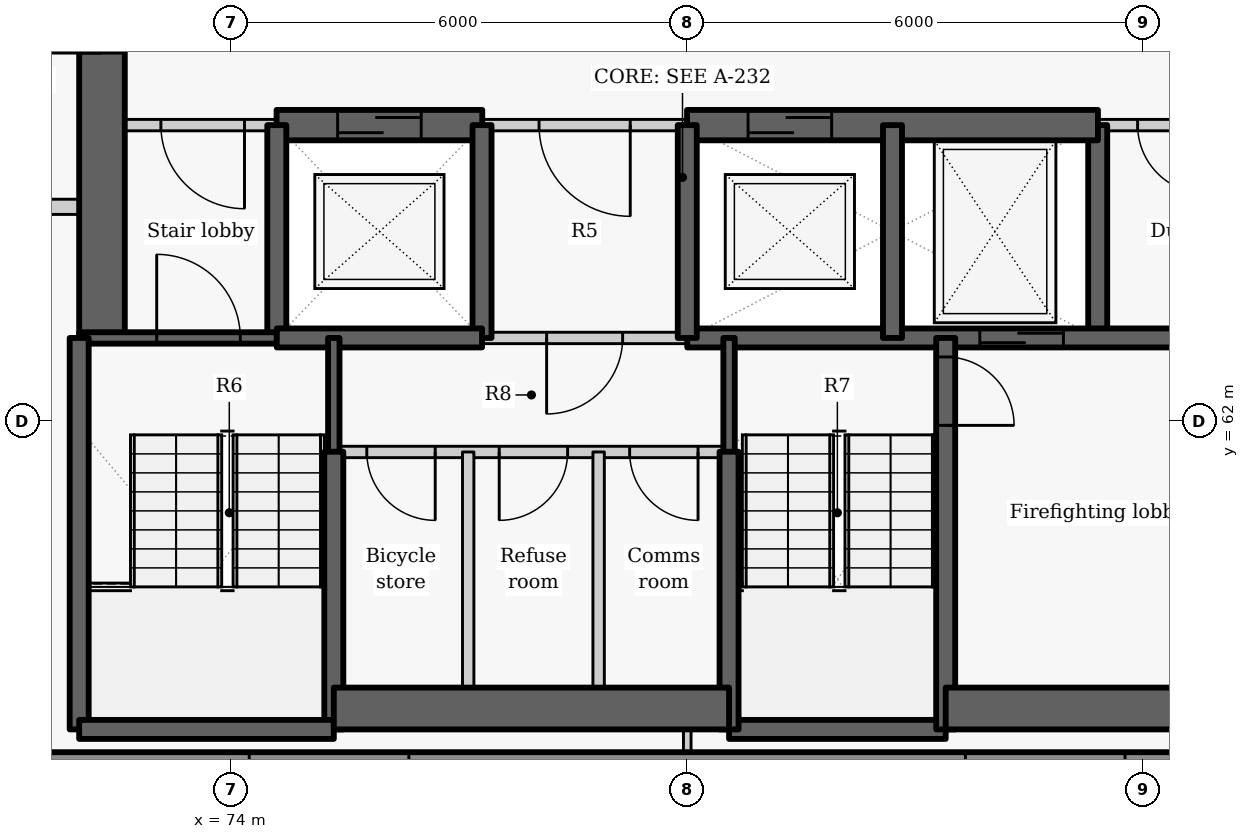
"""IFC4 building model, lengths in metres.
Left out: names, types, materials, properties, quantities, classifications, styles, units other than length and angle.
Written with IfcOpenShell. Run it as: python <this file> out.ifc"""

import sys

from ifc_helpers import new_model, si_unit, direction, frame, frame_2d, origin, place, context, subcontext, project, spatial, rectangle, extrude, element, fill, save


model = new_model("IFC4")
c1 = context("Model", 3, precision=1e-05, world=origin(), true_north=direction((0.0, 1.0)))
c2 = subcontext(c1, "Body", "Model", "MODEL_VIEW")
j1 = project(units=[si_unit("LENGTHUNIT", "METRE"), si_unit("PLANEANGLEUNIT", "RADIAN")], contexts=[c1])
p1 = place(None, origin())
s1 = spatial("IfcSite", under=j1, at=p1, CompositionType="ELEMENT")
p2 = place(p1, origin())
s2 = spatial("IfcBuilding", under=s1, at=p2, CompositionType="ELEMENT")
p3 = place(p2, frame((0.0, 0.0, 180.0)))
s3 = spatial("IfcBuildingStorey", under=s2, at=p3, CompositionType="ELEMENT", Elevation=180.0)
p4 = place(p3, frame((70.551, 57.5, 0.0), z_axis=(0.0, 0.0, 1.0), x_axis=(1.0, 0.0, 0.0)))
e1 = element("IfcWall", 1, at=p4, inside=s3, PredefinedType="SOLIDWALL", context=c2, shape_type="SweptSolid", body=[
    extrude(rectangle(XDim=18.893, YDim=0.3, at=frame_2d((9.446, 0.0))), origin(), (0.0, 0.0, 1.0), 2.425),
])
p5 = place(p4, frame((3.687, 0.0, 0.9)))
e2 = element("IfcOpeningElement", 2, at=p5, cuts=e1, PredefinedType="OPENING", context=c2, shape_type="SweptSolid", body=[
    extrude(rectangle(XDim=2.1, YDim=1.1, at=frame_2d((1.05, 0.55))), frame((0.0, 0.16, 0.0), z_axis=(0.0, -1.0, 0.0), x_axis=(1.0, 0.0, 0.0)), (0.0, 0.0, 1.0), 0.32),
])
p6 = place(p4, frame((13.109, 0.0, 0.9)))
e3 = element("IfcOpeningElement", 3, at=p6, cuts=e1, PredefinedType="OPENING", context=c2, shape_type="SweptSolid", body=[
    extrude(rectangle(XDim=2.1, YDim=1.1, at=frame_2d((1.05, 0.55))), frame((0.0, 0.16, 0.0), z_axis=(0.0, -1.0, 0.0), x_axis=(1.0, 0.0, 0.0)), (0.0, 0.0, 1.0), 0.32),
])
p7 = place(p3, frame((72.3, 63.1, -0.275), z_axis=(0.0, 0.0, 1.0), x_axis=(0.0, 1.0, 0.0)))
e4 = element("IfcWall", 4, at=p7, inside=s3, PredefinedType="SHEAR", context=c2, shape_type="SweptSolid", body=[
    extrude(rectangle(XDim=9.1, YDim=0.6, at=frame_2d((4.55, 0.0))), origin(), (0.0, 0.0, 1.0), 3.3),
])
p8 = place(p7, frame((3.748, 0.0, 0.275)))
e5 = element("IfcOpeningElement", 5, at=p8, cuts=e4, PredefinedType="OPENING", context=c2, shape_type="SweptSolid", body=[
    extrude(rectangle(XDim=1.5, YDim=2.1, at=frame_2d((0.75, 1.05))), frame((0.0, 0.31, 0.0), z_axis=(0.0, -1.0, 0.0), x_axis=(1.0, 0.0, 0.0)), (0.0, 0.0, 1.0), 0.62),
])
p9 = place(p3, frame((85.4, 63.1, -0.275), z_axis=(0.0, 0.0, 1.0), x_axis=(0.0, 1.0, 0.0)))
e6 = element("IfcWall", 6, at=p9, inside=s3, PredefinedType="SHEAR", context=c2, shape_type="SweptSolid", body=[
    extrude(rectangle(XDim=2.8, YDim=0.25, at=frame_2d((1.4, 0.0))), origin(), (0.0, 0.0, 1.0), 3.3),
])
p10 = place(p3, frame((74.603, 65.9, 0.0), z_axis=(0.0, 0.0, 1.0), x_axis=(-1.0, 0.0, 0.0)))
e7 = element("IfcWall", 7, at=p10, inside=s3, PredefinedType="PARTITIONING", context=c2, shape_type="SweptSolid", body=[
    extrude(rectangle(XDim=2.603, YDim=0.15, at=frame_2d((1.302, 0.0))), origin(), (0.0, 0.0, 1.0), 3.025),
])
p11 = place(p10, frame((0.428, 0.0, 0.0)))
e8 = element("IfcOpeningElement", 8, at=p11, cuts=e7, PredefinedType="OPENING", context=c2, shape_type="SweptSolid", body=[
    extrude(rectangle(XDim=1.1, YDim=2.1, at=frame_2d((0.55, 1.05))), frame((0.0, 0.085, 0.0), z_axis=(0.0, -1.0, 0.0), x_axis=(1.0, 0.0, 0.0)), (0.0, 0.0, 1.0), 0.17),
])
p12 = place(p3, frame((80.003, 65.9, 0.0), z_axis=(0.0, 0.0, 1.0), x_axis=(-1.0, 0.0, 0.0)))
e9 = element("IfcWall", 9, at=p12, inside=s3, PredefinedType="PARTITIONING", context=c2, shape_type="SweptSolid", body=[
    extrude(rectangle(XDim=2.706, YDim=0.15, at=frame_2d((1.353, 0.0))), origin(), (0.0, 0.0, 1.0), 3.025),
])
p13 = place(p12, frame((0.753, 0.0, 0.0)))
e10 = element("IfcOpeningElement", 10, at=p13, cuts=e9, PredefinedType="OPENING", context=c2, shape_type="SweptSolid", body=[
    extrude(rectangle(XDim=1.2, YDim=2.1, at=frame_2d((0.6, 1.05))), frame((0.0, 0.085, 0.0), z_axis=(0.0, -1.0, 0.0), x_axis=(1.0, 0.0, 0.0)), (0.0, 0.0, 1.0), 0.17),
])
p14 = place(p3, frame((88.0, 65.9, 0.0), z_axis=(0.0, 0.0, 1.0), x_axis=(-1.0, 0.0, 0.0)))
e11 = element("IfcWall", 11, at=p14, inside=s3, PredefinedType="PARTITIONING", context=c2, shape_type="SweptSolid", body=[
    extrude(rectangle(XDim=2.603, YDim=0.15, at=frame_2d((1.302, 0.0))), origin(), (0.0, 0.0, 1.0), 3.025),
])
p15 = place(p14, frame((1.175, 0.0, 0.0)))
e12 = element("IfcOpeningElement", 12, at=p15, cuts=e11, PredefinedType="OPENING", context=c2, shape_type="SweptSolid", body=[
    extrude(rectangle(XDim=0.9, YDim=2.1, at=frame_2d((0.45, 1.05))), frame((0.0, 0.085, 0.0), z_axis=(0.0, -1.0, 0.0), x_axis=(1.0, 0.0, 0.0)), (0.0, 0.0, 1.0), 0.17),
])
p16 = place(p3, frame((74.597, 65.9, -0.275), z_axis=(0.0, 0.0, 1.0), x_axis=(1.0, 0.0, 0.0)))
e13 = element("IfcWall", 13, at=p16, inside=s3, PredefinedType="SHEAR", context=c2, shape_type="SweptSolid", body=[
    extrude(rectangle(XDim=2.706, YDim=0.4, at=frame_2d((1.353, 0.0))), origin(), (0.0, 0.0, 1.0), 3.3),
])
p17 = place(p16, frame((0.803, 0.0, 0.275)))
e14 = element("IfcOpeningElement", 14, at=p17, cuts=e13, PredefinedType="OPENING", context=c2, shape_type="SweptSolid", body=[
    extrude(rectangle(XDim=1.1, YDim=2.1, at=frame_2d((0.55, 1.05))), frame((0.0, 0.21, 0.0), z_axis=(0.0, -1.0, 0.0), x_axis=(1.0, 0.0, 0.0)), (0.0, 0.0, 1.0), 0.42),
])
p18 = place(p3, frame((79.997, 65.9, -0.275), z_axis=(0.0, 0.0, 1.0), x_axis=(1.0, 0.0, 0.0)))
e15 = element("IfcWall", 15, at=p18, inside=s3, PredefinedType="SHEAR", context=c2, shape_type="SweptSolid", body=[
    extrude(rectangle(XDim=5.406, YDim=0.4, at=frame_2d((2.703, 0.0))), origin(), (0.0, 0.0, 1.0), 3.3),
])
p19 = place(p18, frame((0.803, 0.0, 0.275)))
e16 = element("IfcOpeningElement", 16, at=p19, cuts=e15, PredefinedType="OPENING", context=c2, shape_type="SweptSolid", body=[
    extrude(rectangle(XDim=1.1, YDim=2.1, at=frame_2d((0.55, 1.05))), frame((0.0, 0.21, 0.0), z_axis=(0.0, -1.0, 0.0), x_axis=(1.0, 0.0, 0.0)), (0.0, 0.0, 1.0), 0.42),
])
p20 = place(p3, frame((74.6, 63.1, -0.275), z_axis=(0.0, 0.0, 1.0), x_axis=(0.0, 1.0, 0.0)))
e17 = element("IfcWall", 17, at=p20, inside=s3, PredefinedType="SHEAR", context=c2, shape_type="SweptSolid", body=[
    extrude(rectangle(XDim=2.8, YDim=0.25, at=frame_2d((1.4, 0.0))), origin(), (0.0, 0.0, 1.0), 3.3),
])
p21 = place(p3, frame((72.0, 63.1, -0.275), z_axis=(0.0, 0.0, 1.0), x_axis=(1.0, 0.0, 0.0)))
e18 = element("IfcWall", 18, at=p21, inside=s3, PredefinedType="SHEAR", context=c2, shape_type="SweptSolid", body=[
    extrude(rectangle(XDim=2.6, YDim=0.15, at=frame_2d((1.3, 0.0))), origin(), (0.0, 0.0, 1.0), 3.3),
])
p22 = place(p21, frame((1.02, 0.0, 0.275)))
e19 = element("IfcOpeningElement", 19, at=p22, cuts=e18, PredefinedType="OPENING", context=c2, shape_type="SweptSolid", body=[
    extrude(rectangle(XDim=1.1, YDim=2.1, at=frame_2d((0.55, 1.05))), frame((0.0, 0.085, 0.0), z_axis=(0.0, -1.0, 0.0), x_axis=(1.0, 0.0, 0.0)), (0.0, 0.0, 1.0), 0.17),
])
p23 = place(p3, frame((77.3, 63.1, -0.275), z_axis=(0.0, 0.0, 1.0), x_axis=(0.0, 1.0, 0.0)))
e20 = element("IfcWall", 20, at=p23, inside=s3, PredefinedType="SHEAR", context=c2, shape_type="SweptSolid", body=[
    extrude(rectangle(XDim=2.8, YDim=0.25, at=frame_2d((1.4, 0.0))), origin(), (0.0, 0.0, 1.0), 3.3),
])
p24 = place(p3, frame((74.6, 63.1, -0.275), z_axis=(0.0, 0.0, 1.0), x_axis=(1.0, 0.0, 0.0)))
e21 = element("IfcWall", 21, at=p24, inside=s3, PredefinedType="SHEAR", context=c2, shape_type="SweptSolid", body=[
    extrude(rectangle(XDim=2.7, YDim=0.25, at=frame_2d((1.35, 0.0))), origin(), (0.0, 0.0, 1.0), 3.3),
])
p25 = place(p3, frame((80.0, 63.1, -0.275), z_axis=(0.0, 0.0, 1.0), x_axis=(1.0, 0.0, 0.0)))
e22 = element("IfcWall", 22, at=p25, inside=s3, PredefinedType="SHEAR", context=c2, shape_type="SweptSolid", body=[
    extrude(rectangle(XDim=8.0, YDim=0.25, at=frame_2d((4.0, 0.0))), origin(), (0.0, 0.0, 1.0), 3.3),
])
p26 = place(p25, frame((3.849, 0.0, 0.275)))
e23 = element("IfcOpeningElement", 23, at=p26, cuts=e22, PredefinedType="OPENING", context=c2, shape_type="SweptSolid", body=[
    extrude(rectangle(XDim=1.1, YDim=2.1, at=frame_2d((0.55, 1.05))), frame((0.0, 0.135, 0.0), z_axis=(0.0, -1.0, 0.0), x_axis=(1.0, 0.0, 0.0)), (0.0, 0.0, 1.0), 0.27),
])
p27 = place(p3, frame((80.0, 63.1, -0.275), z_axis=(0.0, 0.0, 1.0), x_axis=(0.0, 1.0, 0.0)))
e24 = element("IfcWall", 24, at=p27, inside=s3, PredefinedType="SHEAR", context=c2, shape_type="SweptSolid", body=[
    extrude(rectangle(XDim=2.8, YDim=0.25, at=frame_2d((1.4, 0.0))), origin(), (0.0, 0.0, 1.0), 3.3),
])
p28 = place(p3, frame((80.0, 63.1, 0.0), z_axis=(0.0, 0.0, 1.0), x_axis=(-1.0, 0.0, 0.0)))
e25 = element("IfcWall", 25, at=p28, inside=s3, PredefinedType="PARTITIONING", context=c2, shape_type="SweptSolid", body=[
    extrude(rectangle(XDim=2.7, YDim=0.15, at=frame_2d((1.35, 0.0))), origin(), (0.0, 0.0, 1.0), 3.025),
])
p29 = place(p28, frame((0.85, 0.0, 0.0)))
e26 = element("IfcOpeningElement", 26, at=p29, cuts=e25, PredefinedType="OPENING", context=c2, shape_type="SweptSolid", body=[
    extrude(rectangle(XDim=1.0, YDim=2.1, at=frame_2d((0.5, 1.05))), frame((0.0, 0.085, 0.0), z_axis=(0.0, -1.0, 0.0), x_axis=(1.0, 0.0, 0.0)), (0.0, 0.0, 1.0), 0.17),
])
p30 = place(p3, frame((82.7, 63.1, -0.275), z_axis=(0.0, 0.0, 1.0), x_axis=(0.0, 1.0, 0.0)))
e27 = element("IfcWall", 27, at=p30, inside=s3, PredefinedType="SHEAR", context=c2, shape_type="SweptSolid", body=[
    extrude(rectangle(XDim=2.8, YDim=0.25, at=frame_2d((1.4, 0.0))), origin(), (0.0, 0.0, 1.0), 3.3),
])
p31 = place(p3, frame((75.35, 61.597, -0.275), z_axis=(0.0, 0.0, 1.0), x_axis=(0.0, 1.0, 0.0)))
e28 = element("IfcWall", 28, at=p31, inside=s3, PredefinedType="SHEAR", context=c2, shape_type="SweptSolid", body=[
    extrude(rectangle(XDim=1.503, YDim=0.15, at=frame_2d((0.751, 0.0))), origin(), (0.0, 0.0, 1.0), 3.3),
])
p32 = place(p3, frame((75.35, 57.95, -0.275), z_axis=(0.0, 0.0, 1.0), x_axis=(0.0, 1.0, 0.0)))
e29 = element("IfcWall", 29, at=p32, inside=s3, PredefinedType="SHEAR", context=c2, shape_type="SweptSolid", body=[
    extrude(rectangle(XDim=3.653, YDim=0.25, at=frame_2d((1.827, 0.0))), origin(), (0.0, 0.0, 1.0), 3.3),
])
p33 = place(p3, frame((72.0, 57.95, -0.275), z_axis=(0.0, 0.0, 1.0), x_axis=(0.0, 1.0, 0.0)))
e30 = element("IfcWall", 30, at=p33, inside=s3, PredefinedType="SHEAR", context=c2, shape_type="SweptSolid", body=[
    extrude(rectangle(XDim=5.15, YDim=0.25, at=frame_2d((2.575, 0.0))), origin(), (0.0, 0.0, 1.0), 3.3),
])
p34 = place(p3, frame((72.0, 57.95, -0.275), z_axis=(0.0, 0.0, 1.0), x_axis=(1.0, 0.0, 0.0)))
e31 = element("IfcWall", 31, at=p34, inside=s3, PredefinedType="SHEAR", context=c2, shape_type="SweptSolid", body=[
    extrude(rectangle(XDim=3.35, YDim=0.25, at=frame_2d((1.675, 0.0))), origin(), (0.0, 0.0, 1.0), 3.3),
])
p35 = place(p3, frame((80.55, 57.95, -0.275), z_axis=(0.0, 0.0, 1.0), x_axis=(1.0, 0.0, 0.0)))
e32 = element("IfcWall", 32, at=p35, inside=s3, PredefinedType="SHEAR", context=c2, shape_type="SweptSolid", body=[
    extrude(rectangle(XDim=2.85, YDim=0.25, at=frame_2d((1.425, 0.0))), origin(), (0.0, 0.0, 1.0), 3.3),
])
p36 = place(p3, frame((83.4, 63.1, -0.275), z_axis=(0.0, 0.0, 1.0), x_axis=(0.0, -1.0, 0.0)))
e33 = element("IfcWall", 33, at=p36, inside=s3, PredefinedType="SHEAR", context=c2, shape_type="SweptSolid", body=[
    extrude(rectangle(XDim=5.15, YDim=0.25, at=frame_2d((2.575, 0.0))), origin(), (0.0, 0.0, 1.0), 3.3),
])
p37 = place(p36, frame((0.25, 0.0, 0.275)))
e34 = element("IfcOpeningElement", 34, at=p37, cuts=e33, PredefinedType="OPENING", context=c2, shape_type="SweptSolid", body=[
    extrude(rectangle(XDim=0.9, YDim=2.1, at=frame_2d((0.45, 1.05))), frame((0.0, 0.135, 0.0), z_axis=(0.0, -1.0, 0.0), x_axis=(1.0, 0.0, 0.0)), (0.0, 0.0, 1.0), 0.27),
])
p38 = place(p3, frame((80.55, 61.597, -0.275), z_axis=(0.0, 0.0, 1.0), x_axis=(0.0, 1.0, 0.0)))
e35 = element("IfcWall", 35, at=p38, inside=s3, PredefinedType="SHEAR", context=c2, shape_type="SweptSolid", body=[
    extrude(rectangle(XDim=1.503, YDim=0.15, at=frame_2d((0.751, 0.0))), origin(), (0.0, 0.0, 1.0), 3.3),
])
p39 = place(p3, frame((80.55, 57.95, -0.275), z_axis=(0.0, 0.0, 1.0), x_axis=(0.0, 1.0, 0.0)))
e36 = element("IfcWall", 36, at=p39, inside=s3, PredefinedType="SHEAR", context=c2, shape_type="SweptSolid", body=[
    extrude(rectangle(XDim=3.653, YDim=0.25, at=frame_2d((1.827, 0.0))), origin(), (0.0, 0.0, 1.0), 3.3),
])
p40 = place(p3, frame((75.35, 58.225, -0.275), z_axis=(0.0, 0.0, 1.0), x_axis=(1.0, 0.0, 0.0)))
e37 = element("IfcWall", 37, at=p40, inside=s3, PredefinedType="SHEAR", context=c2, shape_type="SweptSolid", body=[
    extrude(rectangle(XDim=5.2, YDim=0.55, at=frame_2d((2.6, 0.0))), origin(), (0.0, 0.0, 1.0), 3.3),
])
p41 = place(p3, frame((83.4, 58.225, -0.275), z_axis=(0.0, 0.0, 1.0), x_axis=(1.0, 0.0, 0.0)))
e38 = element("IfcWall", 38, at=p41, inside=s3, PredefinedType="SHEAR", context=c2, shape_type="SweptSolid", body=[
    extrude(rectangle(XDim=4.6, YDim=0.55, at=frame_2d((2.3, 0.0))), origin(), (0.0, 0.0, 1.0), 3.3),
])
p42 = place(p3, frame((80.55, 61.6, 0.0), z_axis=(0.0, 0.0, 1.0), x_axis=(-1.0, 0.0, 0.0)))
e39 = element("IfcWall", 39, at=p42, inside=s3, PredefinedType="PARTITIONING", context=c2, shape_type="SweptSolid", body=[
    extrude(rectangle(XDim=5.2, YDim=0.15, at=frame_2d((2.6, 0.0))), origin(), (0.0, 0.0, 1.0), 3.025),
])
p43 = place(p42, frame((3.866, 0.0, 0.0)))
e40 = element("IfcOpeningElement", 40, at=p43, cuts=e39, PredefinedType="OPENING", context=c2, shape_type="SweptSolid", body=[
    extrude(rectangle(XDim=0.9, YDim=2.1, at=frame_2d((0.45, 1.05))), frame((0.0, 0.085, 0.0), z_axis=(0.0, -1.0, 0.0), x_axis=(1.0, 0.0, 0.0)), (0.0, 0.0, 1.0), 0.17),
])
p44 = place(p42, frame((2.124, 0.0, 0.0)))
e41 = element("IfcOpeningElement", 41, at=p44, cuts=e39, PredefinedType="OPENING", context=c2, shape_type="SweptSolid", body=[
    extrude(rectangle(XDim=0.9, YDim=2.1, at=frame_2d((0.45, 1.05))), frame((0.0, 0.085, 0.0), z_axis=(0.0, -1.0, 0.0), x_axis=(1.0, 0.0, 0.0)), (0.0, 0.0, 1.0), 0.17),
])
p45 = place(p42, frame((0.408, 0.0, 0.0)))
e42 = element("IfcOpeningElement", 42, at=p45, cuts=e39, PredefinedType="OPENING", context=c2, shape_type="SweptSolid", body=[
    extrude(rectangle(XDim=0.9, YDim=2.1, at=frame_2d((0.45, 1.05))), frame((0.0, 0.085, 0.0), z_axis=(0.0, -1.0, 0.0), x_axis=(1.0, 0.0, 0.0)), (0.0, 0.0, 1.0), 0.17),
])
for number, where, z_axis, x_axis in (
    (43, (77.118, 57.95, 0.0), (0.0, 0.0, 1.0), (0.0, 1.0, 0.0)),
    (44, (78.834, 57.95, 0.0), (0.0, 0.0, 1.0), (0.0, 1.0, 0.0)),
):
    element("IfcWall", number, at=place(p3, frame(where, z_axis=z_axis, x_axis=x_axis)), inside=s3, PredefinedType="PARTITIONING", context=c2, shape_type="SweptSolid", body=[
        extrude(rectangle(XDim=3.65, YDim=0.15, at=frame_2d((1.825, 0.0))), origin(), (0.0, 0.0, 1.0), 3.025),
    ])
p46 = place(p3, frame((70.527, 64.825, 0.0), z_axis=(0.0, 0.0, 1.0), x_axis=(1.0, 0.0, 0.0)))
e45 = element("IfcWall", 45, at=p46, inside=s3, PredefinedType="PARTITIONING", context=c2, shape_type="SweptSolid", body=[
    extrude(rectangle(XDim=1.473, YDim=0.2, at=frame_2d((0.736, 0.0))), origin(), (0.0, 0.0, 1.0), 3.025),
])
p47 = place(p3, frame((80.0, 57.65, 0.0), z_axis=(0.0, 0.0, 1.0), x_axis=(0.0, 1.0, 0.0)))
e46 = element("IfcWall", 46, at=p47, inside=s3, PredefinedType="PARTITIONING", context=c2, shape_type="SweptSolid", body=[
    extrude(rectangle(XDim=0.3, YDim=0.1, at=frame_2d((0.15, 0.0))), origin(), (0.0, 0.0, 1.0), 3.025),
])
p48 = place(p11, origin())
e47 = element("IfcDoor", 47, at=p48, inside=s3, OperationType="SINGLE_SWING_LEFT", PredefinedType="DOOR", context=c2, shape_type="SweptSolid", body=[
    extrude(rectangle(XDim=1.1, YDim=2.1, at=frame_2d((0.55, 1.05))), frame((0.0, 0.025, 0.0), z_axis=(0.0, -1.0, 0.0), x_axis=(1.0, 0.0, 0.0)), (0.0, 0.0, 1.0), 0.05),
])
fill(e8, e47)
p49 = place(p17, origin())
e48 = element("IfcDoor", 48, at=p49, inside=s3, OperationType="SLIDING_TO_LEFT", PredefinedType="DOOR", context=c2, shape_type="SweptSolid", body=[
    extrude(rectangle(XDim=1.1, YDim=2.1, at=frame_2d((0.55, 1.05))), frame((0.0, 0.025, 0.0), z_axis=(0.0, -1.0, 0.0), x_axis=(1.0, 0.0, 0.0)), (0.0, 0.0, 1.0), 0.05),
])
fill(e14, e48)
p50 = place(p13, origin())
e49 = element("IfcDoor", 49, at=p50, inside=s3, OperationType="DOUBLE_DOOR_SINGLE_SWING", PredefinedType="DOOR", context=c2, shape_type="SweptSolid", body=[
    extrude(rectangle(XDim=1.2, YDim=2.1, at=frame_2d((0.6, 1.05))), frame((0.0, 0.025, 0.0), z_axis=(0.0, -1.0, 0.0), x_axis=(1.0, 0.0, 0.0)), (0.0, 0.0, 1.0), 0.05),
])
fill(e10, e49)
p51 = place(p19, origin())
e50 = element("IfcDoor", 50, at=p51, inside=s3, OperationType="SLIDING_TO_LEFT", PredefinedType="DOOR", context=c2, shape_type="SweptSolid", body=[
    extrude(rectangle(XDim=1.1, YDim=2.1, at=frame_2d((0.55, 1.05))), frame((0.0, 0.025, 0.0), z_axis=(0.0, -1.0, 0.0), x_axis=(1.0, 0.0, 0.0)), (0.0, 0.0, 1.0), 0.05),
])
fill(e16, e50)
p52 = place(p26, origin())
e51 = element("IfcDoor", 51, at=p52, inside=s3, OperationType="SLIDING_TO_LEFT", PredefinedType="DOOR", context=c2, shape_type="SweptSolid", body=[
    extrude(rectangle(XDim=1.1, YDim=2.1, at=frame_2d((0.55, 1.05))), frame((0.0, 0.025, 0.0), z_axis=(0.0, -1.0, 0.0), x_axis=(1.0, 0.0, 0.0)), (0.0, 0.0, 1.0), 0.05),
])
fill(e23, e51)
p53 = place(p15, origin())
e52 = element("IfcDoor", 52, at=p53, inside=s3, OperationType="SINGLE_SWING_LEFT", PredefinedType="DOOR", context=c2, shape_type="SweptSolid", body=[
    extrude(rectangle(XDim=0.9, YDim=2.1, at=frame_2d((0.45, 1.05))), frame((0.0, 0.025, 0.0), z_axis=(0.0, -1.0, 0.0), x_axis=(1.0, 0.0, 0.0)), (0.0, 0.0, 1.0), 0.05),
])
fill(e12, e52)
p54 = place(p29, origin())
e53 = element("IfcDoor", 53, at=p54, inside=s3, OperationType="SINGLE_SWING_RIGHT", PredefinedType="DOOR", context=c2, shape_type="SweptSolid", body=[
    extrude(rectangle(XDim=1.0, YDim=2.1, at=frame_2d((0.5, 1.05))), frame((0.0, 0.025, 0.0), z_axis=(0.0, -1.0, 0.0), x_axis=(1.0, 0.0, 0.0)), (0.0, 0.0, 1.0), 0.05),
])
fill(e26, e53)
p55 = place(p43, origin())
e54 = element("IfcDoor", 54, at=p55, inside=s3, OperationType="SINGLE_SWING_LEFT", PredefinedType="DOOR", context=c2, shape_type="SweptSolid", body=[
    extrude(rectangle(XDim=0.9, YDim=2.1, at=frame_2d((0.45, 1.05))), frame((0.0, 0.025, 0.0), z_axis=(0.0, -1.0, 0.0), x_axis=(1.0, 0.0, 0.0)), (0.0, 0.0, 1.0), 0.05),
])
fill(e40, e54)
p56 = place(p44, origin())
e55 = element("IfcDoor", 55, at=p56, inside=s3, OperationType="SINGLE_SWING_RIGHT", PredefinedType="DOOR", context=c2, shape_type="SweptSolid", body=[
    extrude(rectangle(XDim=0.9, YDim=2.1, at=frame_2d((0.45, 1.05))), frame((0.0, 0.025, 0.0), z_axis=(0.0, -1.0, 0.0), x_axis=(1.0, 0.0, 0.0)), (0.0, 0.0, 1.0), 0.05),
])
fill(e41, e55)
p57 = place(p45, origin())
e56 = element("IfcDoor", 56, at=p57, inside=s3, OperationType="SINGLE_SWING_LEFT", PredefinedType="DOOR", context=c2, shape_type="SweptSolid", body=[
    extrude(rectangle(XDim=0.9, YDim=2.1, at=frame_2d((0.45, 1.05))), frame((0.0, 0.025, 0.0), z_axis=(0.0, -1.0, 0.0), x_axis=(1.0, 0.0, 0.0)), (0.0, 0.0, 1.0), 0.05),
])
fill(e42, e56)
p58 = place(p22, origin())
e57 = element("IfcDoor", 57, at=p58, inside=s3, OperationType="SINGLE_SWING_LEFT", PredefinedType="DOOR", context=c2, shape_type="SweptSolid", body=[
    extrude(rectangle(XDim=1.1, YDim=2.1, at=frame_2d((0.55, 1.05))), frame((0.0, 0.025, 0.0), z_axis=(0.0, -1.0, 0.0), x_axis=(1.0, 0.0, 0.0)), (0.0, 0.0, 1.0), 0.05),
])
fill(e19, e57)
p59 = place(p37, origin())
e58 = element("IfcDoor", 58, at=p59, inside=s3, OperationType="SINGLE_SWING_RIGHT", PredefinedType="DOOR", context=c2, shape_type="SweptSolid", body=[
    extrude(rectangle(XDim=0.9, YDim=2.1, at=frame_2d((0.45, 1.05))), frame((0.0, 0.025, 0.0), z_axis=(0.0, -1.0, 0.0), x_axis=(1.0, 0.0, 0.0)), (0.0, 0.0, 1.0), 0.05),
])
fill(e34, e58)
p60 = place(p8, origin())
e59 = element("IfcDoor", 59, at=p60, inside=s3, OperationType="DOUBLE_DOOR_SINGLE_SWING", PredefinedType="DOOR", context=c2, shape_type="SweptSolid", body=[
    extrude(rectangle(XDim=1.5, YDim=2.1, at=frame_2d((0.75, 1.05))), frame((0.0, 0.025, 0.0), z_axis=(0.0, -1.0, 0.0), x_axis=(1.0, 0.0, 0.0)), (0.0, 0.0, 1.0), 0.05),
])
fill(e5, e59)
save(model, sys.argv[1])
